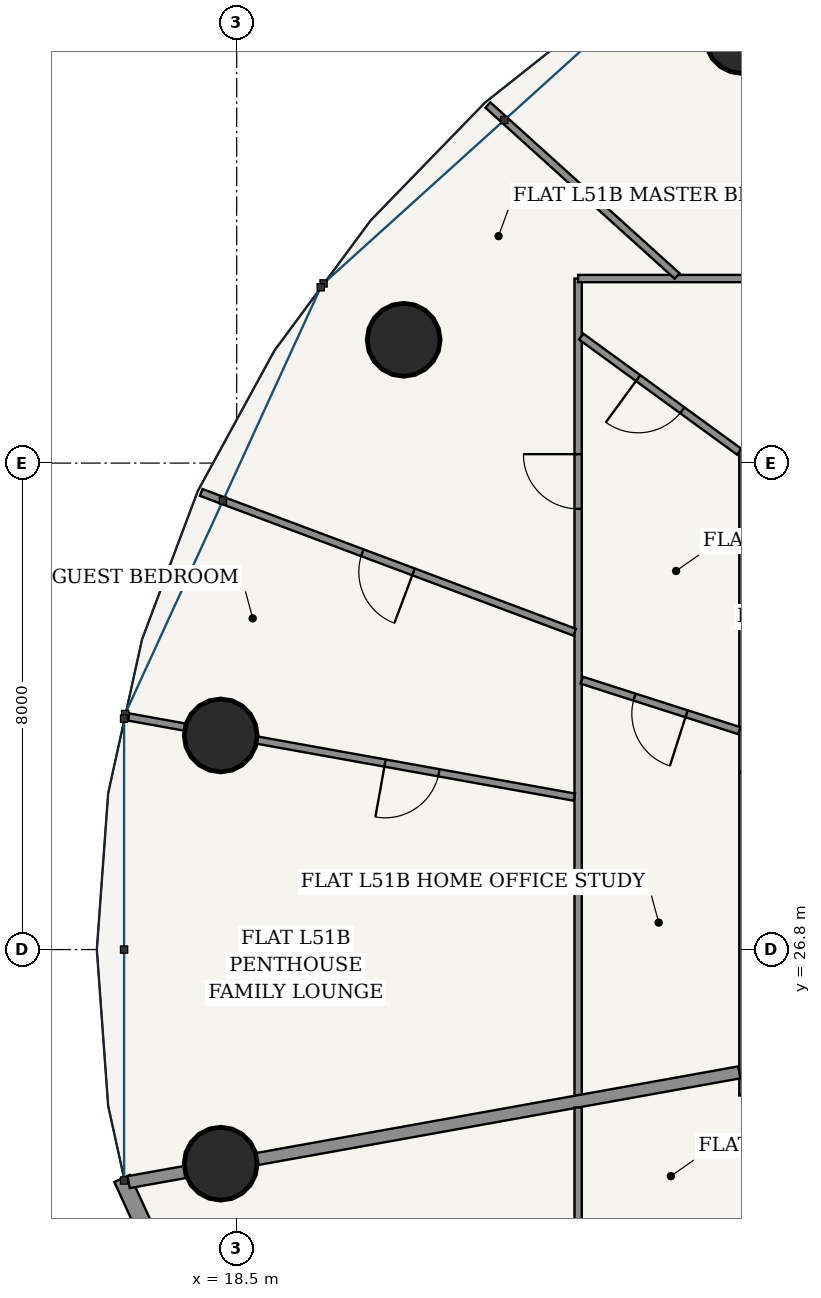
"""IFC4 building model, lengths in metres.
Left out: names, types, materials, properties, quantities, classifications, styles, units other than length and angle.
Written with IfcOpenShell. Run it as: python <this file> out.ifc"""

import sys

from ifc_helpers import new_model, si_unit, direction, frame, frame_2d, origin, origin_2d, place, context, subcontext, project, spatial, rectangle, hollow_circle, extrude, source, transform, mapped, element, fill, save


model = new_model("IFC4")
c1 = context("Model", 3, precision=1e-05, world=origin(), true_north=direction((-0.2419218956, 0.970295726276)))
c2 = subcontext(c1, "Body", "Model", "MODEL_VIEW")
j1 = project(units=[si_unit("LENGTHUNIT", "METRE"), si_unit("PLANEANGLEUNIT", "RADIAN")], contexts=[c1])
p1 = place(None, origin())
s1 = spatial("IfcSite", under=j1, at=p1, CompositionType="ELEMENT")
p2 = place(p1, origin())
s2 = spatial("IfcBuilding", under=s1, at=p2, CompositionType="ELEMENT")
p3 = place(p2, frame((0.0, 0.0, 194.9)))
s3 = spatial("IfcBuildingStorey", under=s2, at=p3, CompositionType="ELEMENT", Elevation=194.9)
for number, where, z_axis, x_axis in (
    (1, (26.805, 41.808, 0.0), (0.0, 0.0, 1.0), (1.0, 0.0, 0.0)),
    (2, (21.246, 36.828, 0.0), (0.0, 0.0, 1.0), (1.0, 0.0, 0.0)),
    (3, (18.237, 30.321, 0.0), (0.0, 0.0, 1.0), (1.0, 0.0, 0.0)),
    (4, (18.237, 23.279, 0.0), (0.0, 0.0, 1.0), (1.0, 0.0, 0.0)),
):
    element("IfcColumn", number, at=place(p3, frame(where, z_axis=z_axis, x_axis=x_axis)), inside=s3, PredefinedType="COLUMN", context=c2, shape_type="SweptSolid", body=[
        extrude(hollow_circle(Radius=0.6, WallThickness=0.038, at=origin_2d()), origin(), (0.0, 0.0, 1.0), 3.7),
    ])
p4 = place(p3, frame((16.615, 23.035, 0.0), z_axis=(0.0, 0.0, 1.0), x_axis=(0.416717018135, -0.909036262641, 0.0)))
e5 = element("IfcWall", 5, at=p4, inside=s3, PredefinedType="SOLIDWALL", context=c2, shape_type="SweptSolid", body=[
    extrude(rectangle(XDim=7.96, YDim=0.28, at=frame_2d((3.98, 0.0))), origin(), (0.0, 0.0, 1.0), 3.435),
])
p5 = place(p4, frame((1.099, 0.0, 0.85)))
e6 = element("IfcOpeningElement", 6, at=p5, cuts=e5, PredefinedType="OPENING", context=c2, shape_type="SweptSolid", body=[
    extrude(rectangle(XDim=2.1, YDim=1.95, at=frame_2d((1.05, 0.975))), frame((0.0, 0.15, 0.0), z_axis=(0.0, -1.0, 0.0), x_axis=(1.0, 0.0, 0.0)), (0.0, 0.0, 1.0), 0.3),
])
p6 = place(p4, frame((4.761, 0.0, 0.85)))
e7 = element("IfcOpeningElement", 7, at=p6, cuts=e5, PredefinedType="OPENING", context=c2, shape_type="SweptSolid", body=[
    extrude(rectangle(XDim=2.1, YDim=1.95, at=frame_2d((1.05, 0.975))), frame((0.0, 0.15, 0.0), z_axis=(0.0, -1.0, 0.0), x_axis=(1.0, 0.0, 0.0)), (0.0, 0.0, 1.0), 0.3),
])
p7 = place(p3, frame((26.845, 24.4, 0.0), z_axis=(0.0, 0.0, 1.0), x_axis=(0.0, 1.0, 0.0)))
e8 = element("IfcWall", 8, at=p7, inside=s3, PredefinedType="PARTITIONING", context=c2, shape_type="SweptSolid", body=[
    extrude(rectangle(XDim=10.625, YDim=0.16, at=frame_2d((5.312, 0.0))), origin(), (0.0, 0.0, 1.0), 2.951),
])
p8 = place(p3, frame((24.115, 24.406, 0.0), z_axis=(0.0, 0.0, 1.0), x_axis=(0.0, 1.0, 0.0)))
e9 = element("IfcWall", 9, at=p8, inside=s3, PredefinedType="PARTITIONING", context=c2, shape_type="SweptSolid", body=[
    extrude(rectangle(XDim=13.429, YDim=0.12, at=frame_2d((6.714, 0.0))), origin(), (0.0, 0.0, 1.0), 2.951),
])
p9 = place(p8, frame((9.641, 0.0, 0.0)))
e10 = element("IfcOpeningElement", 10, at=p9, cuts=e9, PredefinedType="OPENING", context=c2, shape_type="SweptSolid", body=[
    extrude(rectangle(XDim=0.9, YDim=2.15, at=frame_2d((0.45, 1.075))), frame((0.0, 0.07, 0.0), z_axis=(0.0, -1.0, 0.0), x_axis=(1.0, 0.0, 0.0)), (0.0, 0.0, 1.0), 0.14),
])
p10 = place(p3, frame((24.115, 37.835, 0.0), z_axis=(0.0, 0.0, 1.0), x_axis=(1.0, 0.0, 0.0)))
e11 = element("IfcWall", 11, at=p10, inside=s3, PredefinedType="PARTITIONING", context=c2, shape_type="SweptSolid", body=[
    extrude(rectangle(XDim=7.47, YDim=0.12, at=frame_2d((3.735, 0.0))), origin(), (0.0, 0.0, 1.0), 2.951),
])
p11 = place(p10, frame((3.943, 0.0, 0.0)))
e12 = element("IfcOpeningElement", 12, at=p11, cuts=e11, PredefinedType="OPENING", context=c2, shape_type="SweptSolid", body=[
    extrude(rectangle(XDim=0.9, YDim=2.15, at=frame_2d((0.45, 1.075))), frame((0.0, 0.07, 0.0), z_axis=(0.0, -1.0, 0.0), x_axis=(1.0, 0.0, 0.0)), (0.0, 0.0, 1.0), 0.14),
])
p12 = place(p3, frame((25.743, 37.876, 0.0), z_axis=(0.0, 0.0, 1.0), x_axis=(-0.741943837234, 0.670462036502, 0.0)))
e13 = element("IfcWall", 13, at=p12, inside=s3, PredefinedType="PARTITIONING", context=c2, shape_type="SweptSolid", body=[
    extrude(rectangle(XDim=4.194, YDim=0.12, at=frame_2d((2.097, 0.0))), origin(), (0.0, 0.0, 1.0), 2.951),
])
p13 = place(p3, frame((24.057, 32.019, 0.0), z_axis=(0.0, 0.0, 1.0), x_axis=(-0.936540194592, 0.350560214389, 0.0)))
e14 = element("IfcWall", 14, at=p13, inside=s3, PredefinedType="PARTITIONING", context=c2, shape_type="SweptSolid", body=[
    extrude(rectangle(XDim=6.556, YDim=0.12, at=frame_2d((3.278, 0.0))), origin(), (0.0, 0.0, 1.0), 2.951),
])
p14 = place(p13, frame((2.828, 0.0, 0.0)))
e15 = element("IfcOpeningElement", 15, at=p14, cuts=e14, PredefinedType="OPENING", context=c2, shape_type="SweptSolid", body=[
    extrude(rectangle(XDim=0.9, YDim=2.15, at=frame_2d((0.45, 1.075))), frame((0.0, 0.07, 0.0), z_axis=(0.0, -1.0, 0.0), x_axis=(1.0, 0.0, 0.0)), (0.0, 0.0, 1.0), 0.14),
])
p15 = place(p3, frame((24.054, 29.307, 0.0), z_axis=(0.0, 0.0, 1.0), x_axis=(-0.984227185588, 0.176909149424, 0.0)))
e16 = element("IfcWall", 16, at=p15, inside=s3, PredefinedType="PARTITIONING", context=c2, shape_type="SweptSolid", body=[
    extrude(rectangle(XDim=7.448, YDim=0.12, at=frame_2d((3.724, 0.0))), origin(), (0.0, 0.0, 1.0), 2.951),
])
p16 = place(p15, frame((2.264, 0.0, 0.0)))
e17 = element("IfcOpeningElement", 17, at=p16, cuts=e16, PredefinedType="OPENING", context=c2, shape_type="SweptSolid", body=[
    extrude(rectangle(XDim=0.9, YDim=2.15, at=frame_2d((0.45, 1.075))), frame((0.0, 0.07, 0.0), z_axis=(0.0, -1.0, 0.0), x_axis=(1.0, 0.0, 0.0)), (0.0, 0.0, 1.0), 0.14),
])
p17 = place(p3, frame((26.765, 34.986, 0.0), z_axis=(0.0, 0.0, 1.0), x_axis=(-0.808220499107, 0.588879974887, 0.0)))
e18 = element("IfcWall", 18, at=p17, inside=s3, PredefinedType="PARTITIONING", context=c2, shape_type="SweptSolid", body=[
    extrude(rectangle(XDim=3.217, YDim=0.12, at=frame_2d((1.608, 0.0))), origin(), (0.0, 0.0, 1.0), 3.11),
])
p18 = place(p17, frame((1.158, 0.0, 0.0)))
e19 = element("IfcOpeningElement", 19, at=p18, cuts=e18, PredefinedType="OPENING", context=c2, shape_type="SweptSolid", body=[
    extrude(rectangle(XDim=0.9, YDim=2.15, at=frame_2d((0.45, 1.075))), frame((0.0, 0.07, 0.0), z_axis=(0.0, -1.0, 0.0), x_axis=(1.0, 0.0, 0.0)), (0.0, 0.0, 1.0), 0.14),
])
p19 = place(p3, frame((26.765, 30.4, 0.0), z_axis=(0.0, 0.0, 1.0), x_axis=(-0.952315722301, 0.305114347514, 0.0)))
e20 = element("IfcWall", 20, at=p19, inside=s3, PredefinedType="PARTITIONING", context=c2, shape_type="SweptSolid", body=[
    extrude(rectangle(XDim=2.72, YDim=0.12, at=frame_2d((1.36, 0.0))), origin(), (0.0, 0.0, 1.0), 3.435),
])
p20 = place(p19, frame((0.91, 0.0, 0.0)))
e21 = element("IfcOpeningElement", 21, at=p20, cuts=e20, PredefinedType="OPENING", context=c2, shape_type="SweptSolid", body=[
    extrude(rectangle(XDim=0.9, YDim=2.15, at=frame_2d((0.45, 1.075))), frame((0.0, 0.07, 0.0), z_axis=(0.0, -1.0, 0.0), x_axis=(1.0, 0.0, 0.0)), (0.0, 0.0, 1.0), 0.14),
])
p21 = place(p3, frame((26.765, 24.781, 0.0), z_axis=(0.0, 0.0, 1.0), x_axis=(-0.984226684914, -0.176911934879, 0.0)))
e22 = element("IfcWall", 22, at=p21, inside=s3, PredefinedType="PARTITIONING", context=c2, shape_type="SweptSolid", body=[
    extrude(rectangle(XDim=10.202, YDim=0.2, at=frame_2d((5.101, 0.0))), origin(), (0.0, 0.0, 1.0), 2.951),
])
p22 = place(p3, frame((24.115, 21.59, 0.0), z_axis=(0.0, 0.0, 1.0), x_axis=(0.0, 1.0, 0.0)))
e23 = element("IfcWall", 23, at=p22, inside=s3, PredefinedType="PARTITIONING", context=c2, shape_type="SweptSolid", body=[
    extrude(rectangle(XDim=2.612, YDim=0.12, at=frame_2d((1.306, 0.0))), origin(), (0.0, 0.0, 1.0), 3.11),
])
m1 = source(origin(), c2, "Body", "SweptSolid", [
    extrude(rectangle(XDim=0.9, YDim=2.15, at=frame_2d((0.45, 1.075))), frame((0.0, 0.025, 0.0), z_axis=(0.0, -1.0, 0.0), x_axis=(1.0, 0.0, 0.0)), (0.0, 0.0, 1.0), 0.05),
])
p23 = place(p18, origin())
e24 = element("IfcDoor", 24, at=p23, inside=s3, OperationType="SINGLE_SWING_RIGHT", PredefinedType="DOOR", context=c2, shape_type="MappedRepresentation", body=[
    mapped(m1, transform((0.0, 0.0, 0.0), scale=1.0)),
])
fill(e19, e24)
p24 = place(p20, origin())
e25 = element("IfcDoor", 25, at=p24, inside=s3, OperationType="SINGLE_SWING_LEFT", PredefinedType="DOOR", context=c2, shape_type="MappedRepresentation", body=[
    mapped(m1, transform((0.0, 0.0, 0.0), scale=1.0)),
])
fill(e21, e25)
p25 = place(p9, origin())
e26 = element("IfcDoor", 26, at=p25, inside=s3, OperationType="SINGLE_SWING_RIGHT", PredefinedType="DOOR", context=c2, shape_type="MappedRepresentation", body=[
    mapped(m1, transform((0.0, 0.0, 0.0), scale=1.0)),
])
fill(e10, e26)
p26 = place(p14, origin())
e27 = element("IfcDoor", 27, at=p26, inside=s3, OperationType="SINGLE_SWING_LEFT", PredefinedType="DOOR", context=c2, shape_type="MappedRepresentation", body=[
    mapped(m1, transform((0.0, 0.0, 0.0), scale=1.0)),
])
fill(e15, e27)
p27 = place(p16, origin())
e28 = element("IfcDoor", 28, at=p27, inside=s3, OperationType="SINGLE_SWING_RIGHT", PredefinedType="DOOR", context=c2, shape_type="MappedRepresentation", body=[
    mapped(m1, transform((0.0, 0.0, 0.0), scale=1.0)),
])
fill(e17, e28)
save(model, sys.argv[1])
